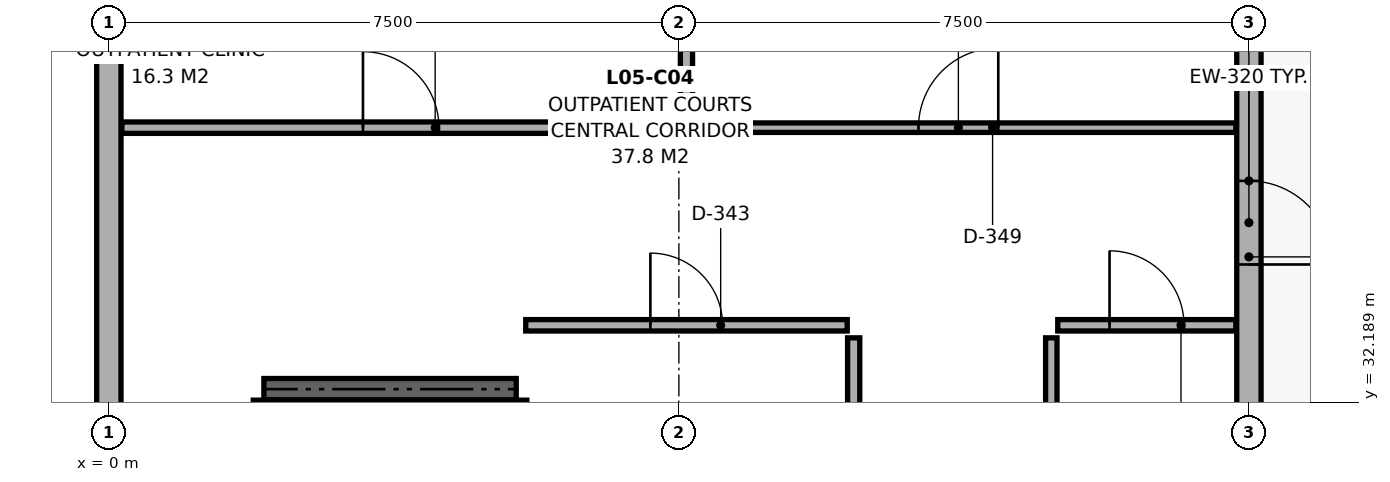
"""IFC4 building model, lengths in metres.
Left out: names, types, materials, properties, quantities, classifications, styles, units other than length and angle.
Written with IfcOpenShell. Run it as: python <this file> out.ifc"""

import sys

from ifc_helpers import new_model, si_unit, direction, frame, frame_2d, origin, place, context, subcontext, project, spatial, rectangle, extrude, element, fill, save


model = new_model("IFC4")
c1 = context("Model", 3, precision=1e-05, world=origin(), true_north=direction((0.0, 1.0)))
c2 = subcontext(c1, "Body", "Model", "MODEL_VIEW")
j1 = project(units=[si_unit("LENGTHUNIT", "METRE"), si_unit("PLANEANGLEUNIT", "RADIAN")], contexts=[c1])
p1 = place(None, origin())
s1 = spatial("IfcSite", under=j1, at=p1, CompositionType="ELEMENT")
p2 = place(p1, origin())
s2 = spatial("IfcBuilding", under=s1, at=p2, CompositionType="ELEMENT")
p3 = place(p2, frame((0.0, 0.0, 21.5)))
s3 = spatial("IfcBuildingStorey", under=s2, at=p3, CompositionType="ELEMENT", Elevation=21.5)
p4 = place(p3, frame((15.0, 38.05, 0.0), z_axis=(0.0, 0.0, 1.0), x_axis=(0.0, -1.0, 0.0)))
e1 = element("IfcWall", 1, at=p4, inside=s3, PredefinedType="SOLIDWALL", context=c2, shape_type="SweptSolid", body=[
    extrude(rectangle(XDim=7.0, YDim=0.32, at=frame_2d((3.5, 0.0))), origin(), (0.0, 0.0, 1.0), 3.7),
])
p5 = place(p4, frame((2.95, 0.0, 0.0)))
e2 = element("IfcOpeningElement", 2, at=p5, cuts=e1, PredefinedType="OPENING", context=c2, shape_type="SweptSolid", body=[
    extrude(rectangle(XDim=1.1, YDim=2.15, at=frame_2d((0.55, 1.075))), frame((0.0, 0.172, 0.0), z_axis=(0.0, -1.0, 0.0), x_axis=(1.0, 0.0, 0.0)), (0.0, 0.0, 1.0), 0.344),
])
p6 = place(p3, frame((0.0, 31.05, 0.0), z_axis=(0.0, 0.0, 1.0), x_axis=(0.0, 1.0, 0.0)))
e3 = element("IfcWall", 3, at=p6, inside=s3, PredefinedType="SOLIDWALL", context=c2, shape_type="SweptSolid", body=[
    extrude(rectangle(XDim=7.0, YDim=0.32, at=frame_2d((3.5, 0.0))), origin(), (0.0, 0.0, 1.0), 3.7),
])
p7 = place(p3, frame((5.36, 24.985, 0.0), z_axis=(0.0, 0.0, 1.0), x_axis=(0.0, 1.0, 0.0)))
e4 = element("IfcWall", 4, at=p7, inside=s3, PredefinedType="SHEAR", context=c2, shape_type="SweptSolid", body=[
    extrude(rectangle(XDim=7.23, YDim=0.28, at=frame_2d((3.615, 0.0))), origin(), (0.0, 0.0, 1.0), 3.72),
])
p8 = place(p3, frame((5.36, 32.36, 0.0), z_axis=(0.0, 0.0, 1.0), x_axis=(-1.0, 0.0, 0.0)))
e5 = element("IfcWall", 5, at=p8, inside=s3, PredefinedType="SHEAR", context=c2, shape_type="SweptSolid", body=[
    extrude(rectangle(XDim=3.32, YDim=0.28, at=frame_2d((1.66, 0.0))), origin(), (0.0, 0.0, 1.0), 3.72),
])
p9 = place(p3, frame((2.04, 32.215, 0.0), z_axis=(0.0, 0.0, 1.0), x_axis=(0.0, -1.0, 0.0)))
e6 = element("IfcWall", 6, at=p9, inside=s3, PredefinedType="SHEAR", context=c2, shape_type="SweptSolid", body=[
    extrude(rectangle(XDim=7.23, YDim=0.28, at=frame_2d((3.615, 0.0))), origin(), (0.0, 0.0, 1.0), 3.72),
])
p10 = place(p3, frame((0.172, 35.8, 0.0), z_axis=(0.0, 0.0, 1.0), x_axis=(1.0, 0.0, 0.0)))
e7 = element("IfcWall", 7, at=p10, inside=s3, PredefinedType="PARTITIONING", context=c2, shape_type="SweptSolid", body=[
    extrude(rectangle(XDim=7.343, YDim=0.15, at=frame_2d((3.671, 0.0))), origin(), (0.0, 0.0, 1.0), 3.7),
])
p11 = place(p10, frame((3.171, 0.0, 0.0)))
e8 = element("IfcOpeningElement", 8, at=p11, cuts=e7, PredefinedType="OPENING", context=c2, shape_type="SweptSolid", body=[
    extrude(rectangle(XDim=1.0, YDim=2.15, at=frame_2d((0.5, 1.075))), frame((0.0, 0.087, 0.0), z_axis=(0.0, -1.0, 0.0), x_axis=(1.0, 0.0, 0.0)), (0.0, 0.0, 1.0), 0.174),
])
p12 = place(p3, frame((7.527, 35.8, 0.0), z_axis=(0.0, 0.0, 1.0), x_axis=(1.0, 0.0, 0.0)))
e9 = element("IfcWall", 9, at=p12, inside=s3, PredefinedType="PARTITIONING", context=c2, shape_type="SweptSolid", body=[
    extrude(rectangle(XDim=7.301, YDim=0.125, at=frame_2d((3.65, 0.0))), origin(), (0.0, 0.0, 1.0), 3.7),
])
p13 = place(p12, frame((3.125, 0.0, 0.0)))
e10 = element("IfcOpeningElement", 10, at=p13, cuts=e9, PredefinedType="OPENING", context=c2, shape_type="SweptSolid", body=[
    extrude(rectangle(XDim=1.05, YDim=2.15, at=frame_2d((0.525, 1.075))), frame((0.0, 0.074, 0.0), z_axis=(0.0, -1.0, 0.0), x_axis=(1.0, 0.0, 0.0)), (0.0, 0.0, 1.0), 0.149),
])
p14 = place(p3, frame((5.485, 33.2, 0.0), z_axis=(0.0, 0.0, 1.0), x_axis=(1.0, 0.0, 0.0)))
e11 = element("IfcWall", 11, at=p14, inside=s3, PredefinedType="PARTITIONING", context=c2, shape_type="SweptSolid", body=[
    extrude(rectangle(XDim=4.23, YDim=0.15, at=frame_2d((2.115, 0.0))), origin(), (0.0, 0.0, 1.0), 3.7),
])
p15 = place(p14, frame((1.64, 0.0, 0.0)))
e12 = element("IfcOpeningElement", 12, at=p15, cuts=e11, PredefinedType="OPENING", context=c2, shape_type="SweptSolid", body=[
    extrude(rectangle(XDim=0.95, YDim=2.15, at=frame_2d((0.475, 1.075))), frame((0.0, 0.087, 0.0), z_axis=(0.0, -1.0, 0.0), x_axis=(1.0, 0.0, 0.0)), (0.0, 0.0, 1.0), 0.174),
])
p16 = place(p3, frame((12.485, 33.2, 0.0), z_axis=(0.0, 0.0, 1.0), x_axis=(1.0, 0.0, 0.0)))
e13 = element("IfcWall", 13, at=p16, inside=s3, PredefinedType="PARTITIONING", context=c2, shape_type="SweptSolid", body=[
    extrude(rectangle(XDim=2.343, YDim=0.15, at=frame_2d((1.171, 0.0))), origin(), (0.0, 0.0, 1.0), 3.7),
])
p17 = place(p16, frame((0.681, 0.0, 0.0)))
e14 = element("IfcOpeningElement", 14, at=p17, cuts=e13, PredefinedType="OPENING", context=c2, shape_type="SweptSolid", body=[
    extrude(rectangle(XDim=0.98, YDim=2.12, at=frame_2d((0.49, 1.06))), frame((0.0, 0.087, 0.0), z_axis=(0.0, -1.0, 0.0), x_axis=(1.0, 0.0, 0.0)), (0.0, 0.0, 1.0), 0.174),
])
p18 = place(p3, frame((7.6, 35.875, 0.0), z_axis=(0.0, 0.0, 1.0), x_axis=(0.0, 1.0, 0.0)))
e15 = element("IfcWall", 15, at=p18, inside=s3, PredefinedType="PARTITIONING", context=c2, shape_type="SweptSolid", body=[
    extrude(rectangle(XDim=2.164, YDim=0.16, at=frame_2d((1.082, 0.0))), origin(), (0.0, 0.0, 1.0), 3.7),
])
p19 = place(p3, frame((9.8, 24.965, 0.0), z_axis=(0.0, 0.0, 1.0), x_axis=(0.0, 1.0, 0.0)))
e16 = element("IfcWall", 16, at=p19, inside=s3, PredefinedType="PARTITIONING", context=c2, shape_type="SweptSolid", body=[
    extrude(rectangle(XDim=8.07, YDim=0.16, at=frame_2d((4.035, 0.0))), origin(), (0.0, 0.0, 1.0), 3.7),
])
p20 = place(p3, frame((12.4, 15.447, 0.0), z_axis=(0.0, 0.0, 1.0), x_axis=(0.0, 1.0, 0.0)))
e17 = element("IfcWall", 17, at=p20, inside=s3, PredefinedType="PARTITIONING", context=c2, shape_type="SweptSolid", body=[
    extrude(rectangle(XDim=17.588, YDim=0.15, at=frame_2d((8.794, 0.0))), origin(), (0.0, 0.0, 1.0), 3.7),
])
p21 = place(p5, origin())
e18 = element("IfcDoor", 18, at=p21, inside=s3, OperationType="SINGLE_SWING_RIGHT", PredefinedType="DOOR", context=c2, shape_type="SweptSolid", body=[
    extrude(rectangle(XDim=1.1, YDim=2.15, at=frame_2d((0.55, 1.075))), frame((0.0, 0.025, 0.0), z_axis=(0.0, -1.0, 0.0), x_axis=(1.0, 0.0, 0.0)), (0.0, 0.0, 1.0), 0.05),
])
fill(e2, e18)
p22 = place(p11, origin())
e19 = element("IfcDoor", 19, at=p22, inside=s3, OperationType="SINGLE_SWING_LEFT", PredefinedType="DOOR", context=c2, shape_type="SweptSolid", body=[
    extrude(rectangle(XDim=1.0, YDim=2.15, at=frame_2d((0.5, 1.075))), frame((0.0, 0.025, 0.0), z_axis=(0.0, -1.0, 0.0), x_axis=(1.0, 0.0, 0.0)), (0.0, 0.0, 1.0), 0.05),
])
fill(e8, e19)
p23 = place(p13, origin())
e20 = element("IfcDoor", 20, at=p23, inside=s3, OperationType="SINGLE_SWING_RIGHT", PredefinedType="DOOR", context=c2, shape_type="SweptSolid", body=[
    extrude(rectangle(XDim=1.05, YDim=2.15, at=frame_2d((0.525, 1.075))), frame((0.0, 0.025, 0.0), z_axis=(0.0, -1.0, 0.0), x_axis=(1.0, 0.0, 0.0)), (0.0, 0.0, 1.0), 0.05),
])
fill(e10, e20)
p24 = place(p15, origin())
e21 = element("IfcDoor", 21, at=p24, inside=s3, OperationType="SINGLE_SWING_LEFT", PredefinedType="DOOR", context=c2, shape_type="SweptSolid", body=[
    extrude(rectangle(XDim=0.95, YDim=2.15, at=frame_2d((0.475, 1.075))), frame((0.0, 0.025, 0.0), z_axis=(0.0, -1.0, 0.0), x_axis=(1.0, 0.0, 0.0)), (0.0, 0.0, 1.0), 0.05),
])
fill(e12, e21)
p25 = place(p17, origin())
e22 = element("IfcDoor", 22, at=p25, inside=s3, OperationType="SINGLE_SWING_LEFT", PredefinedType="DOOR", context=c2, shape_type="SweptSolid", body=[
    extrude(rectangle(XDim=0.98, YDim=2.12, at=frame_2d((0.49, 1.06))), frame((0.0, 0.025, 0.0), z_axis=(0.0, -1.0, 0.0), x_axis=(1.0, 0.0, 0.0)), (0.0, 0.0, 1.0), 0.05),
])
fill(e14, e22)
save(model, sys.argv[1])
